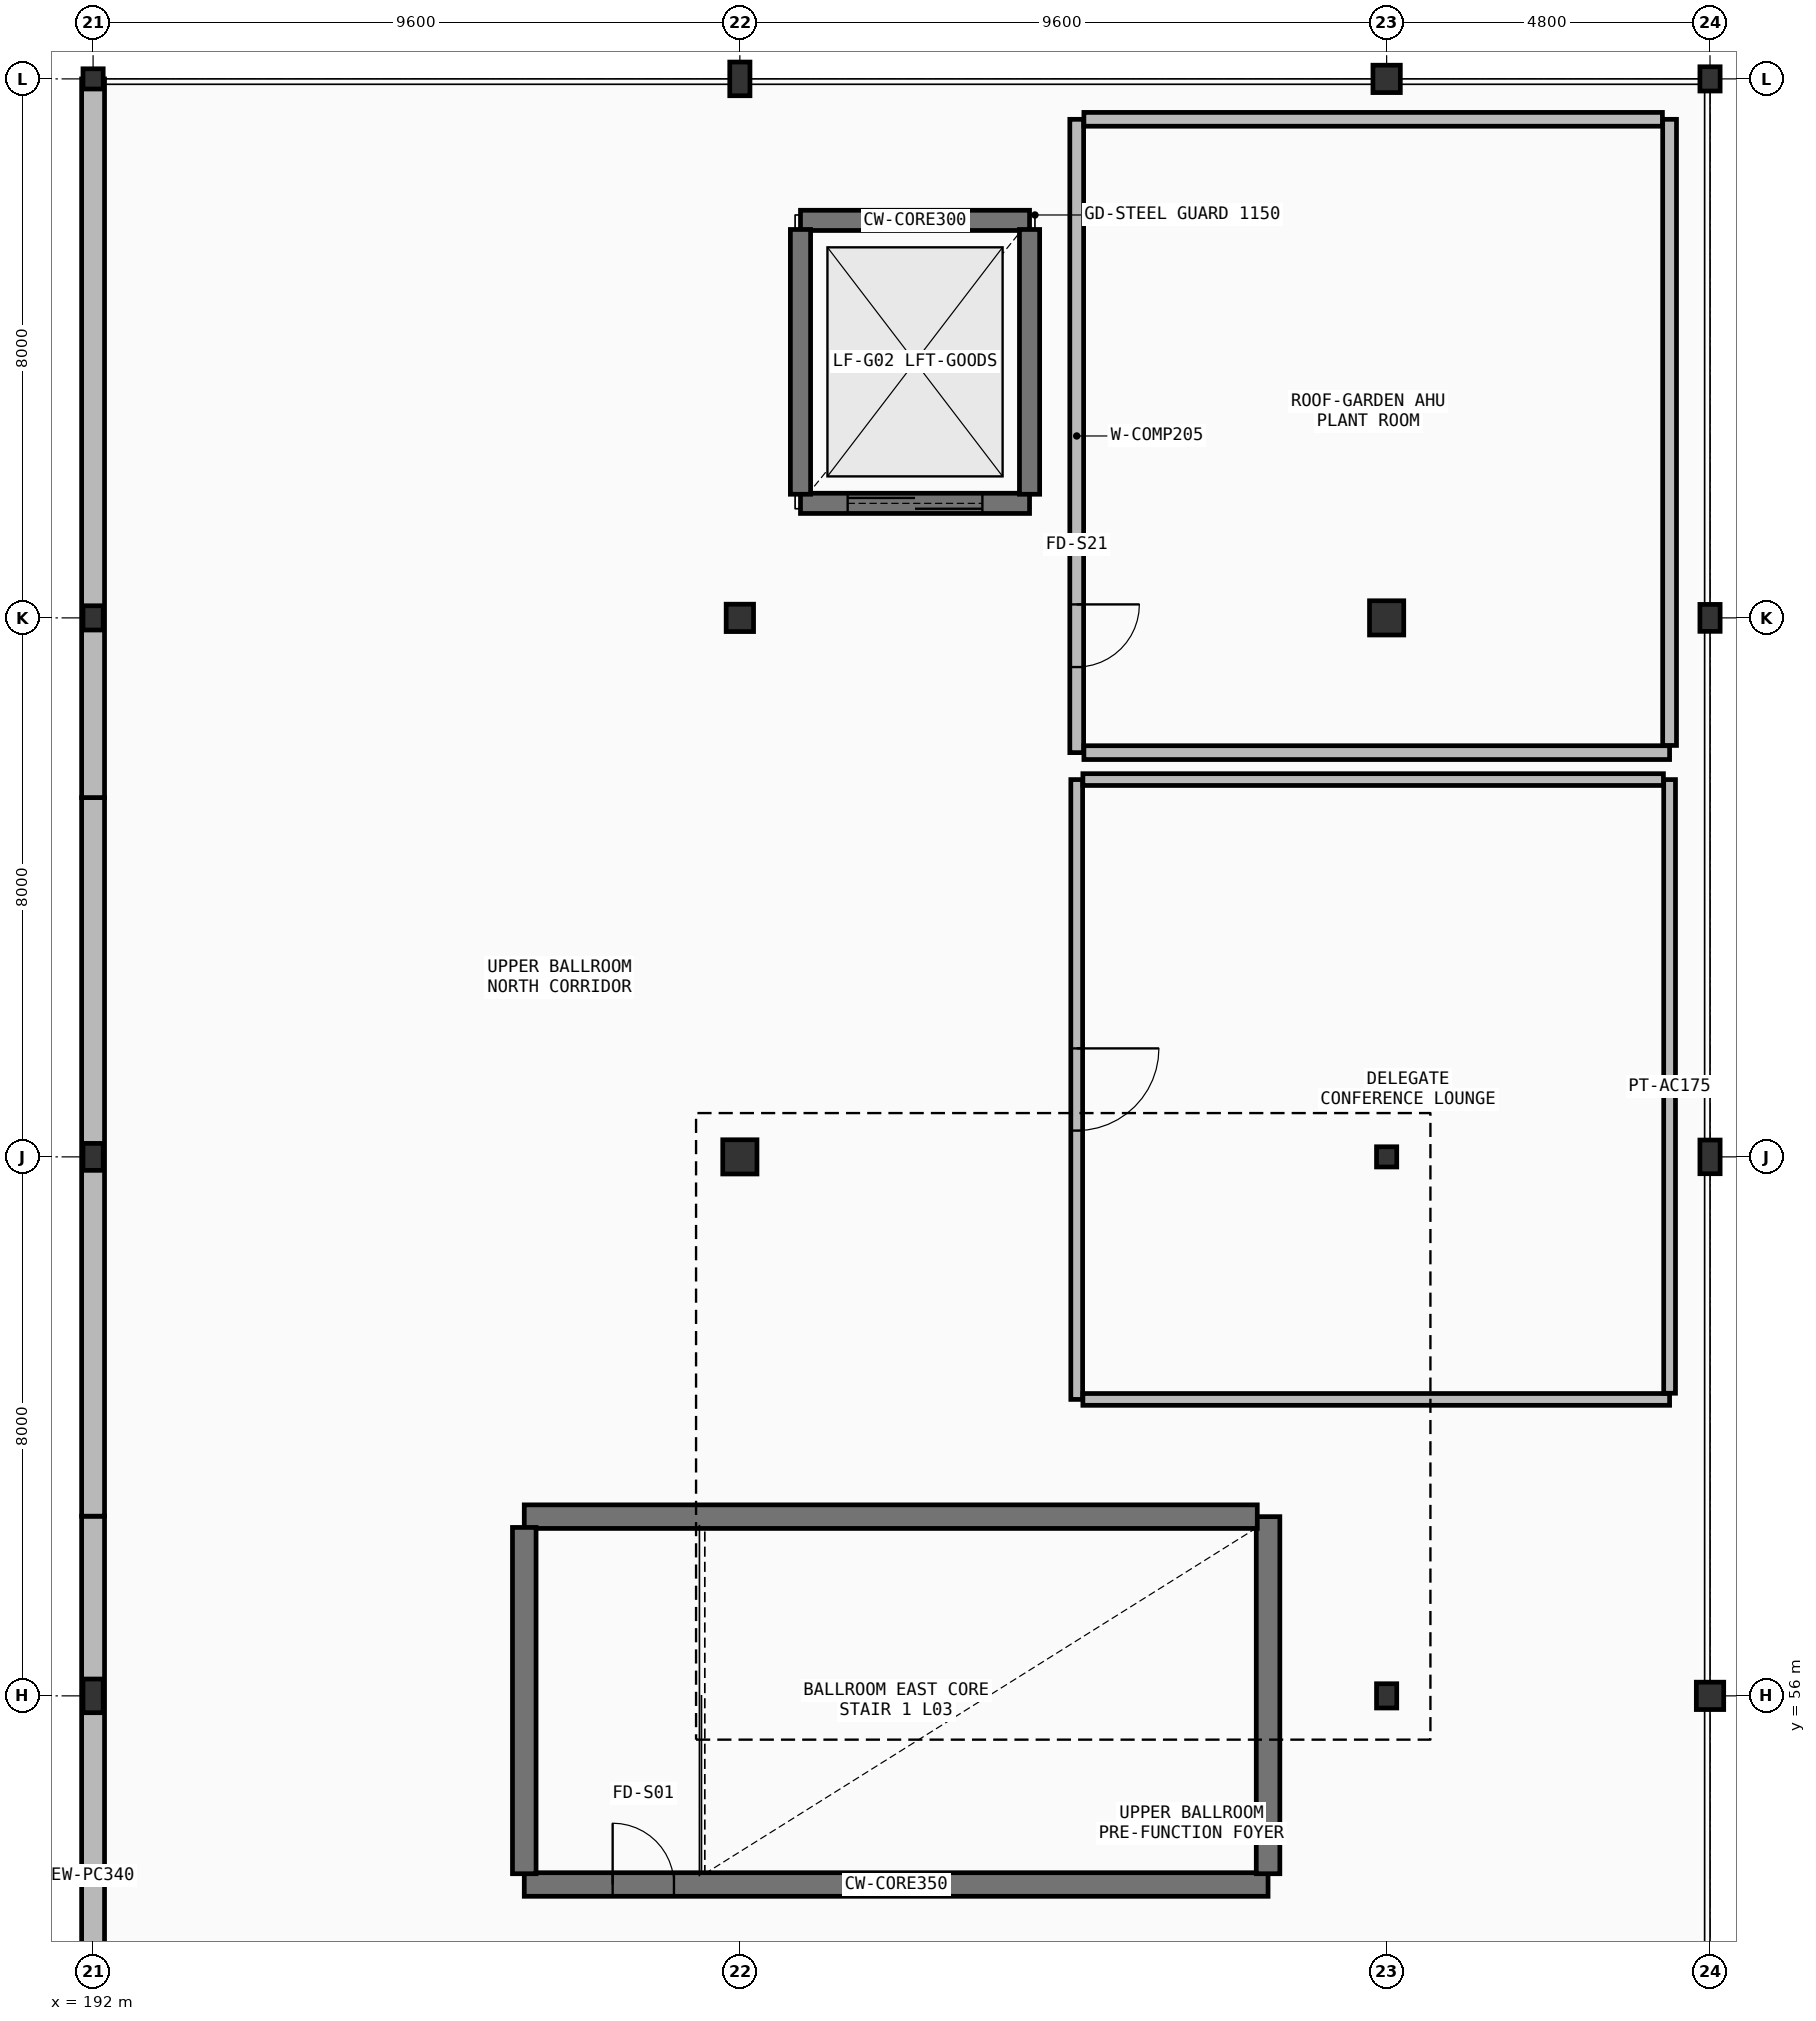
"""IFC4 building model, lengths in metres.
Left out: names, types, materials, properties, quantities, classifications, styles, units other than length and angle.
Written with IfcOpenShell. Run it as: python <this file> out.ifc"""

import sys

from ifc_helpers import new_model, si_unit, direction, frame, frame_2d, origin, origin_2d, place, context, subcontext, project, spatial, rectangle, hollow_circle, i_section, extrude, element, fill, save


model = new_model("IFC4")
c1 = context("Model", 3, precision=1e-05, world=origin(), true_north=direction((0.0, 1.0)))
c2 = subcontext(c1, "Body", "Model", "MODEL_VIEW")
j1 = project(units=[si_unit("LENGTHUNIT", "METRE"), si_unit("PLANEANGLEUNIT", "RADIAN")], contexts=[c1])
p1 = place(None, origin())
s1 = spatial("IfcSite", under=j1, at=p1, CompositionType="ELEMENT")
p2 = place(p1, origin())
s2 = spatial("IfcBuilding", under=s1, at=p2, CompositionType="ELEMENT")
p3 = place(p2, frame((0.0, 0.0, 15.9)))
s3 = spatial("IfcBuildingStorey", under=s2, at=p3, CompositionType="ELEMENT", Elevation=15.9)
p4 = place(p3, frame((192.0, 56.0, 0.0), z_axis=(0.0, 0.0, 1.0), x_axis=(1.0, 0.0, 0.0)))
e1 = element("IfcColumn", 1, at=p4, inside=s3, PredefinedType="COLUMN", context=c2, shape_type="SweptSolid", body=[
    extrude(i_section(OverallWidth=0.3, OverallDepth=0.5, WebThickness=0.014, FlangeThickness=0.028, FilletRadius=0.027, at=origin_2d()), origin(), (0.0, 0.0, 1.0), 1.52),
])
p5 = place(p3, frame((192.0, 64.0, 0.0), z_axis=(0.0, 0.0, 1.0), x_axis=(1.0, 0.0, 0.0)))
e2 = element("IfcColumn", 2, at=p5, inside=s3, PredefinedType="COLUMN", context=c2, shape_type="SweptSolid", body=[
    extrude(i_section(OverallWidth=0.3, OverallDepth=0.4, WebThickness=0.013, FlangeThickness=0.024, FilletRadius=0.027, at=origin_2d()), origin(), (0.0, 0.0, 1.0), 1.52),
])
p6 = place(p3, frame((192.0, 72.0, 0.0), z_axis=(0.0, 0.0, 1.0), x_axis=(1.0, 0.0, 0.0)))
e3 = element("IfcColumn", 3, at=p6, inside=s3, PredefinedType="COLUMN", context=c2, shape_type="SweptSolid", body=[
    extrude(i_section(OverallWidth=0.3, OverallDepth=0.36, WebThickness=0.012, FlangeThickness=0.022, FilletRadius=0.027, at=origin_2d()), origin(), (0.0, 0.0, 1.0), 1.52),
])
p7 = place(p3, frame((192.0, 80.0, 0.0), z_axis=(0.0, 0.0, 1.0), x_axis=(1.0, 0.0, 0.0)))
e4 = element("IfcColumn", 4, at=p7, inside=s3, PredefinedType="COLUMN", context=c2, shape_type="SweptSolid", body=[
    extrude(i_section(OverallWidth=0.3, OverallDepth=0.3, WebThickness=0.011, FlangeThickness=0.019, FilletRadius=0.027, at=origin_2d()), origin(), (0.0, 0.0, 1.0), 1.52),
])
p8 = place(p3, frame((201.6, 64.0, 0.0), z_axis=(0.0, 0.0, 1.0), x_axis=(1.0, 0.0, 0.0)))
e5 = element("IfcColumn", 5, at=p8, inside=s3, PredefinedType="COLUMN", context=c2, shape_type="SweptSolid", body=[
    extrude(hollow_circle(Radius=0.254, WallThickness=0.025, at=origin_2d()), origin(), (0.0, 0.0, 1.0), 4.5),
])
p9 = place(p3, frame((201.6, 72.0, 0.0), z_axis=(0.0, 0.0, 1.0), x_axis=(1.0, 0.0, 0.0)))
e6 = element("IfcColumn", 6, at=p9, inside=s3, PredefinedType="COLUMN", context=c2, shape_type="SweptSolid", body=[
    extrude(hollow_circle(Radius=0.203, WallThickness=0.02, at=origin_2d()), origin(), (0.0, 0.0, 1.0), 4.5),
])
p10 = place(p3, frame((201.6, 80.0, 0.0), z_axis=(0.0, 0.0, 1.0), x_axis=(1.0, 0.0, 0.0)))
e7 = element("IfcColumn", 7, at=p10, inside=s3, PredefinedType="COLUMN", context=c2, shape_type="SweptSolid", body=[
    extrude(i_section(OverallWidth=0.3, OverallDepth=0.5, WebThickness=0.014, FlangeThickness=0.028, FilletRadius=0.027, at=origin_2d()), origin(), (0.0, 0.0, 1.0), 4.5),
])
p11 = place(p3, frame((211.2, 56.0, 0.0), z_axis=(0.0, 0.0, 1.0), x_axis=(1.0, 0.0, 0.0)))
e8 = element("IfcColumn", 8, at=p11, inside=s3, PredefinedType="COLUMN", context=c2, shape_type="SweptSolid", body=[
    extrude(i_section(OverallWidth=0.3, OverallDepth=0.36, WebThickness=0.012, FlangeThickness=0.022, FilletRadius=0.027, at=origin_2d()), origin(), (0.0, 0.0, 1.0), 4.5),
])
p12 = place(p3, frame((211.2, 64.0, 0.0), z_axis=(0.0, 0.0, 1.0), x_axis=(1.0, 0.0, 0.0)))
e9 = element("IfcColumn", 9, at=p12, inside=s3, PredefinedType="COLUMN", context=c2, shape_type="SweptSolid", body=[
    extrude(i_section(OverallWidth=0.3, OverallDepth=0.3, WebThickness=0.011, FlangeThickness=0.019, FilletRadius=0.027, at=origin_2d()), origin(), (0.0, 0.0, 1.0), 4.5),
])
p13 = place(p3, frame((211.2, 72.0, 0.0), z_axis=(0.0, 0.0, 1.0), x_axis=(1.0, 0.0, 0.0)))
e10 = element("IfcColumn", 10, at=p13, inside=s3, PredefinedType="COLUMN", context=c2, shape_type="SweptSolid", body=[
    extrude(hollow_circle(Radius=0.254, WallThickness=0.025, at=origin_2d()), origin(), (0.0, 0.0, 1.0), 4.5),
])
for number, where, z_axis, x_axis in (
    (11, (211.2, 80.0, 0.0), (0.0, 0.0, 1.0), (1.0, 0.0, 0.0)),
    (12, (216.0, 56.0, 0.0), (0.0, 0.0, 1.0), (1.0, 0.0, 0.0)),
):
    element("IfcColumn", number, at=place(p3, frame(where, z_axis=z_axis, x_axis=x_axis)), inside=s3, PredefinedType="COLUMN", context=c2, shape_type="SweptSolid", body=[
        extrude(hollow_circle(Radius=0.203, WallThickness=0.02, at=origin_2d()), origin(), (0.0, 0.0, 1.0), 4.5),
    ])
p14 = place(p3, frame((216.0, 64.0, 0.0), z_axis=(0.0, 0.0, 1.0), x_axis=(1.0, 0.0, 0.0)))
e13 = element("IfcColumn", 13, at=p14, inside=s3, PredefinedType="COLUMN", context=c2, shape_type="SweptSolid", body=[
    extrude(i_section(OverallWidth=0.3, OverallDepth=0.5, WebThickness=0.014, FlangeThickness=0.028, FilletRadius=0.027, at=origin_2d()), origin(), (0.0, 0.0, 1.0), 4.5),
])
p15 = place(p3, frame((216.0, 72.0, 0.0), z_axis=(0.0, 0.0, 1.0), x_axis=(1.0, 0.0, 0.0)))
e14 = element("IfcColumn", 14, at=p15, inside=s3, PredefinedType="COLUMN", context=c2, shape_type="SweptSolid", body=[
    extrude(i_section(OverallWidth=0.3, OverallDepth=0.4, WebThickness=0.013, FlangeThickness=0.024, FilletRadius=0.027, at=origin_2d()), origin(), (0.0, 0.0, 1.0), 4.5),
])
p16 = place(p3, frame((216.0, 80.0, 0.0), z_axis=(0.0, 0.0, 1.0), x_axis=(1.0, 0.0, 0.0)))
e15 = element("IfcColumn", 15, at=p16, inside=s3, PredefinedType="COLUMN", context=c2, shape_type="SweptSolid", body=[
    extrude(i_section(OverallWidth=0.3, OverallDepth=0.36, WebThickness=0.012, FlangeThickness=0.022, FilletRadius=0.027, at=origin_2d()), origin(), (0.0, 0.0, 1.0), 4.5),
])
p17 = place(p3, frame((192.0, 48.0, 0.0), z_axis=(0.0, 0.0, 1.0), x_axis=(0.0, 1.0, 0.0)))
e16 = element("IfcWall", 16, at=p17, inside=s3, PredefinedType="SOLIDWALL", context=c2, shape_type="SweptSolid", body=[
    extrude(rectangle(XDim=10.667, YDim=0.34, at=frame_2d((5.333, 0.0))), origin(), (0.0, 0.0, 1.0), 1.44),
])
p18 = place(p3, frame((192.0, 58.667, 0.0), z_axis=(0.0, 0.0, 1.0), x_axis=(0.0, 1.0, 0.0)))
e17 = element("IfcWall", 17, at=p18, inside=s3, PredefinedType="SOLIDWALL", context=c2, shape_type="SweptSolid", body=[
    extrude(rectangle(XDim=10.666, YDim=0.34, at=frame_2d((5.333, 0.0))), origin(), (0.0, 0.0, 1.0), 1.44),
])
p19 = place(p3, frame((192.0, 69.333, 0.0), z_axis=(0.0, 0.0, 1.0), x_axis=(0.0, 1.0, 0.0)))
e18 = element("IfcWall", 18, at=p19, inside=s3, PredefinedType="SOLIDWALL", context=c2, shape_type="SweptSolid", body=[
    extrude(rectangle(XDim=10.667, YDim=0.34, at=frame_2d((5.333, 0.0))), origin(), (0.0, 0.0, 1.0), 1.44),
])
p20 = place(p3, frame((198.4, 53.2, 0.0), z_axis=(0.0, 0.0, 1.0), x_axis=(1.0, 0.0, 0.0)))
e19 = element("IfcWall", 19, at=p20, inside=s3, PredefinedType="SHEAR", context=c2, shape_type="SweptSolid", body=[
    extrude(rectangle(XDim=11.04, YDim=0.35, at=frame_2d((5.52, 0.0))), origin(), (0.0, 0.0, 1.0), 3.835),
])
p21 = place(p20, frame((1.312, 0.0, 0.0)))
e20 = element("IfcOpeningElement", 20, at=p21, cuts=e19, PredefinedType="OPENING", context=c2, shape_type="SweptSolid", body=[
    extrude(rectangle(XDim=0.91, YDim=2.08, at=frame_2d((0.455, 1.04))), frame((0.0, 0.185, 0.0), z_axis=(0.0, -1.0, 0.0), x_axis=(1.0, 0.0, 0.0)), (0.0, 0.0, 1.0), 0.37),
])
p22 = place(p3, frame((209.44, 53.36, 0.0), z_axis=(0.0, 0.0, 1.0), x_axis=(0.0, 1.0, 0.0)))
e21 = element("IfcWall", 21, at=p22, inside=s3, PredefinedType="SHEAR", context=c2, shape_type="SweptSolid", body=[
    extrude(rectangle(XDim=5.3, YDim=0.35, at=frame_2d((2.65, 0.0))), origin(), (0.0, 0.0, 1.0), 3.835),
])
p23 = place(p3, frame((209.28, 58.66, 0.0), z_axis=(0.0, 0.0, 1.0), x_axis=(-1.0, 0.0, 0.0)))
e22 = element("IfcWall", 22, at=p23, inside=s3, PredefinedType="SHEAR", context=c2, shape_type="SweptSolid", body=[
    extrude(rectangle(XDim=10.88, YDim=0.35, at=frame_2d((5.44, 0.0))), origin(), (0.0, 0.0, 1.0), 3.835),
])
p24 = place(p3, frame((198.4, 58.5, 0.0), z_axis=(0.0, 0.0, 1.0), x_axis=(0.0, -1.0, 0.0)))
e23 = element("IfcWall", 23, at=p24, inside=s3, PredefinedType="SHEAR", context=c2, shape_type="SweptSolid", body=[
    extrude(rectangle(XDim=5.14, YDim=0.35, at=frame_2d((2.57, 0.0))), origin(), (0.0, 0.0, 1.0), 3.835),
])
p25 = place(p3, frame((205.9, 77.9, 0.0), z_axis=(0.0, 0.0, 1.0), x_axis=(-1.0, 0.0, 0.0)))
e24 = element("IfcWall", 24, at=p25, inside=s3, PredefinedType="SHEAR", context=c2, shape_type="SweptSolid", body=[
    extrude(rectangle(XDim=3.4, YDim=0.3, at=frame_2d((1.7, 0.0))), origin(), (0.0, 0.0, 1.0), 3.835),
])
p26 = place(p3, frame((202.5, 73.7, 0.0), z_axis=(0.0, 0.0, 1.0), x_axis=(1.0, 0.0, 0.0)))
e25 = element("IfcWall", 25, at=p26, inside=s3, PredefinedType="SHEAR", context=c2, shape_type="SweptSolid", body=[
    extrude(rectangle(XDim=3.4, YDim=0.3, at=frame_2d((1.7, 0.0))), origin(), (0.0, 0.0, 1.0), 3.835),
])
p27 = place(p26, frame((0.7, 0.0, 0.0)))
e26 = element("IfcOpeningElement", 26, at=p27, cuts=e25, PredefinedType="OPENING", context=c2, shape_type="SweptSolid", body=[
    extrude(rectangle(XDim=2.0, YDim=2.5, at=frame_2d((1.0, 1.25))), frame((0.0, 0.16, 0.0), z_axis=(0.0, -1.0, 0.0), x_axis=(1.0, 0.0, 0.0)), (0.0, 0.0, 1.0), 0.32),
])
for number, where, z_axis, x_axis in (
    (27, (205.9, 73.835, 0.0), (0.0, 0.0, 1.0), (0.0, 1.0, 0.0)),
    (28, (202.5, 77.765, 0.0), (0.0, 0.0, 1.0), (0.0, -1.0, 0.0)),
):
    element("IfcWall", number, at=place(p3, frame(where, z_axis=z_axis, x_axis=x_axis)), inside=s3, PredefinedType="SHEAR", context=c2, shape_type="SweptSolid", body=[
        extrude(rectangle(XDim=3.93, YDim=0.3, at=frame_2d((1.965, 0.0))), origin(), (0.0, 0.0, 1.0), 3.835),
    ])
p28 = place(p3, frame((206.6, 69.6, 0.0), z_axis=(0.0, 0.0, 1.0), x_axis=(0.0, -1.0, 0.0)))
e29 = element("IfcWall", 29, at=p28, inside=s3, PredefinedType="PARTITIONING", context=c2, shape_type="SweptSolid", body=[
    extrude(rectangle(XDim=9.2, YDim=0.175, at=frame_2d((4.6, 0.0))), origin(), (0.0, 0.0, 1.0), 3.255),
])
p29 = place(p28, frame((3.99, 0.0, 0.0)))
e30 = element("IfcOpeningElement", 30, at=p29, cuts=e29, PredefinedType="OPENING", context=c2, shape_type="SweptSolid", body=[
    extrude(rectangle(XDim=1.22, YDim=2.36, at=frame_2d((0.61, 1.18))), frame((0.0, 0.097, 0.0), z_axis=(0.0, -1.0, 0.0), x_axis=(1.0, 0.0, 0.0)), (0.0, 0.0, 1.0), 0.195),
])
p30 = place(p3, frame((206.691, 60.4, 0.0), z_axis=(0.0, 0.0, 1.0), x_axis=(1.0, 0.0, 0.0)))
e31 = element("IfcWall", 31, at=p30, inside=s3, PredefinedType="PARTITIONING", context=c2, shape_type="SweptSolid", body=[
    extrude(rectangle(XDim=8.708, YDim=0.175, at=frame_2d((4.354, 0.0))), origin(), (0.0, 0.0, 1.0), 3.205),
])
p31 = place(p3, frame((215.4, 60.491, 0.0), z_axis=(0.0, 0.0, 1.0), x_axis=(0.0, 1.0, 0.0)))
e32 = element("IfcWall", 32, at=p31, inside=s3, PredefinedType="PARTITIONING", context=c2, shape_type="SweptSolid", body=[
    extrude(rectangle(XDim=9.109, YDim=0.175, at=frame_2d((4.554, 0.0))), origin(), (0.0, 0.0, 1.0), 3.305),
])
p32 = place(p3, frame((215.309, 69.6, 0.0), z_axis=(0.0, 0.0, 1.0), x_axis=(-1.0, 0.0, 0.0)))
e33 = element("IfcWall", 33, at=p32, inside=s3, PredefinedType="PARTITIONING", context=c2, shape_type="SweptSolid", body=[
    extrude(rectangle(XDim=8.617, YDim=0.175, at=frame_2d((4.309, 0.0))), origin(), (0.0, 0.0, 1.0), 3.255),
])
p33 = place(p3, frame((206.6, 79.4, 0.0), z_axis=(0.0, 0.0, 1.0), x_axis=(0.0, -1.0, 0.0)))
e34 = element("IfcWall", 34, at=p33, inside=s3, PredefinedType="SOLIDWALL", context=c2, shape_type="SweptSolid", body=[
    extrude(rectangle(XDim=9.4, YDim=0.205, at=frame_2d((4.7, 0.0))), origin(), (0.0, 0.0, 1.0), 3.305),
])
p34 = place(p33, frame((7.2, 0.0, 0.0)))
e35 = element("IfcOpeningElement", 35, at=p34, cuts=e34, PredefinedType="OPENING", context=c2, shape_type="SweptSolid", body=[
    extrude(rectangle(XDim=0.93, YDim=2.22, at=frame_2d((0.465, 1.11))), frame((0.0, 0.113, 0.0), z_axis=(0.0, -1.0, 0.0), x_axis=(1.0, 0.0, 0.0)), (0.0, 0.0, 1.0), 0.225),
])
p35 = place(p3, frame((206.707, 70.0, 0.0), z_axis=(0.0, 0.0, 1.0), x_axis=(1.0, 0.0, 0.0)))
e36 = element("IfcWall", 36, at=p35, inside=s3, PredefinedType="SOLIDWALL", context=c2, shape_type="SweptSolid", body=[
    extrude(rectangle(XDim=8.693, YDim=0.205, at=frame_2d((4.347, 0.0))), origin(), (0.0, 0.0, 1.0), 3.255),
])
p36 = place(p3, frame((215.4, 70.106, 0.0), z_axis=(0.0, 0.0, 1.0), x_axis=(0.0, 1.0, 0.0)))
e37 = element("IfcWall", 37, at=p36, inside=s3, PredefinedType="SOLIDWALL", context=c2, shape_type="SweptSolid", body=[
    extrude(rectangle(XDim=9.293, YDim=0.205, at=frame_2d((4.647, 0.0))), origin(), (0.0, 0.0, 1.0), 3.005),
])
p37 = place(p3, frame((215.293, 79.4, 0.0), z_axis=(0.0, 0.0, 1.0), x_axis=(-1.0, 0.0, 0.0)))
e38 = element("IfcWall", 38, at=p37, inside=s3, PredefinedType="SOLIDWALL", context=c2, shape_type="SweptSolid", body=[
    extrude(rectangle(XDim=8.587, YDim=0.205, at=frame_2d((4.293, 0.0))), origin(), (0.0, 0.0, 1.0), 2.905),
])
p38 = place(p21, origin())
e39 = element("IfcDoor", 39, at=p38, inside=s3, OperationType="SINGLE_SWING_RIGHT", PredefinedType="DOOR", context=c2, shape_type="SweptSolid", body=[
    extrude(rectangle(XDim=0.91, YDim=2.08, at=frame_2d((0.455, 1.04))), frame((0.0, 0.025, 0.0), z_axis=(0.0, -1.0, 0.0), x_axis=(1.0, 0.0, 0.0)), (0.0, 0.0, 1.0), 0.05),
])
fill(e20, e39)
p39 = place(p27, origin())
e40 = element("IfcDoor", 40, at=p39, inside=s3, OperationType="DOUBLE_DOOR_SLIDING", PredefinedType="DOOR", context=c2, shape_type="SweptSolid", body=[
    extrude(rectangle(XDim=2.0, YDim=2.5, at=frame_2d((1.0, 1.25))), frame((0.0, 0.025, 0.0), z_axis=(0.0, -1.0, 0.0), x_axis=(1.0, 0.0, 0.0)), (0.0, 0.0, 1.0), 0.05),
])
fill(e26, e40)
p40 = place(p29, origin())
e41 = element("IfcDoor", 41, at=p40, inside=s3, OperationType="SINGLE_SWING_RIGHT", PredefinedType="DOOR", context=c2, shape_type="SweptSolid", body=[
    extrude(rectangle(XDim=1.22, YDim=2.36, at=frame_2d((0.61, 1.18))), frame((0.0, 0.025, 0.0), z_axis=(0.0, -1.0, 0.0), x_axis=(1.0, 0.0, 0.0)), (0.0, 0.0, 1.0), 0.05),
])
fill(e30, e41)
p41 = place(p34, origin())
e42 = element("IfcDoor", 42, at=p41, inside=s3, OperationType="SINGLE_SWING_RIGHT", PredefinedType="DOOR", context=c2, shape_type="SweptSolid", body=[
    extrude(rectangle(XDim=0.93, YDim=2.22, at=frame_2d((0.465, 1.11))), frame((0.0, 0.025, 0.0), z_axis=(0.0, -1.0, 0.0), x_axis=(1.0, 0.0, 0.0)), (0.0, 0.0, 1.0), 0.05),
])
fill(e35, e42)
save(model, sys.argv[1])
